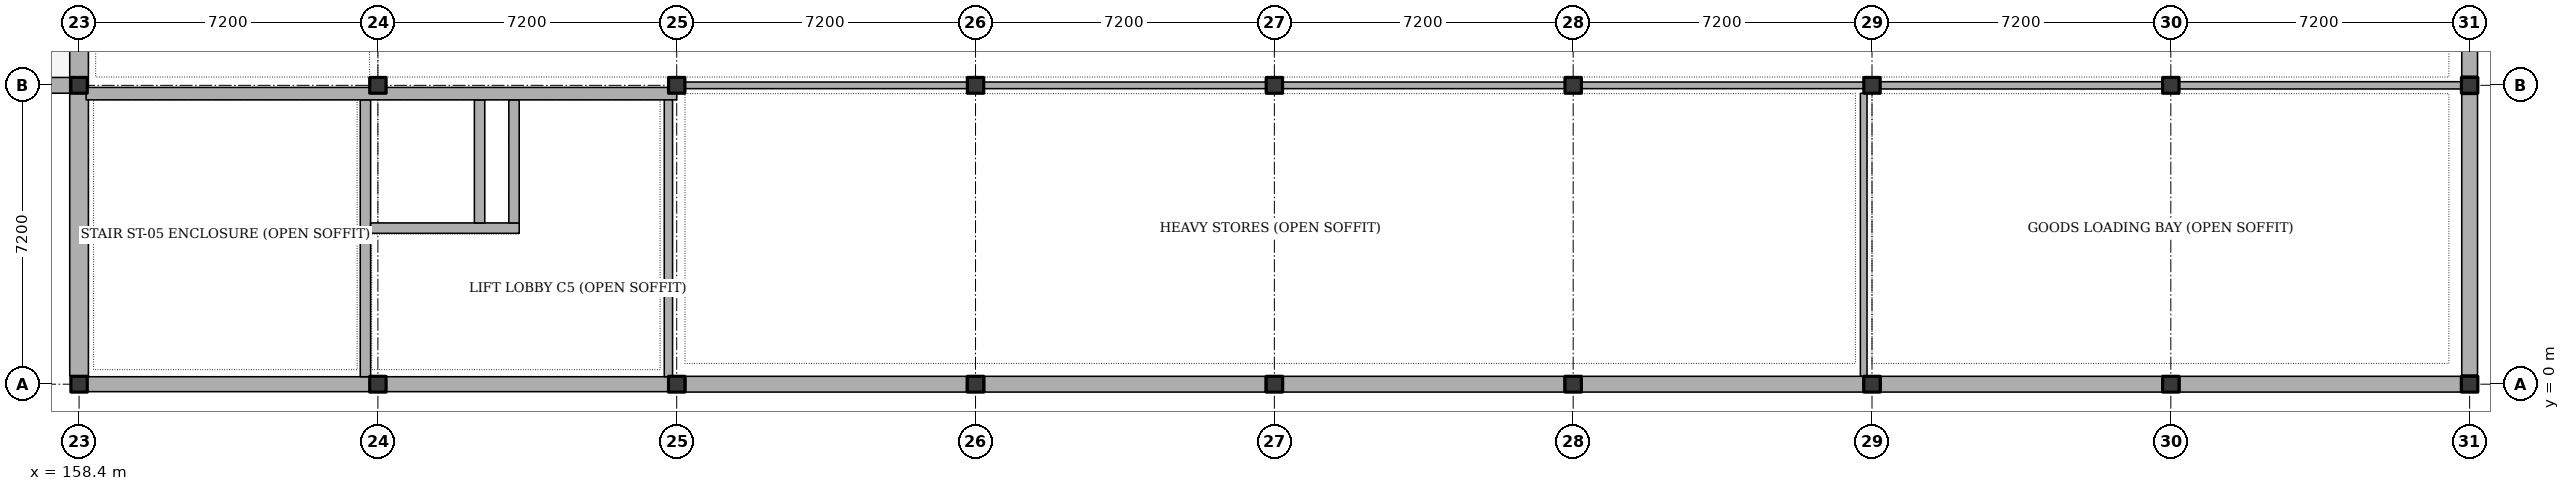
"""IFC4 building model, lengths in metres.
Left out: names, types, materials, properties, quantities, classifications, styles, units other than length and angle.
Written with IfcOpenShell. Run it as: python <this file> out.ifc"""

import sys

from ifc_helpers import new_model, si_unit, direction, frame, frame_2d, origin, origin_2d, place, context, subcontext, project, spatial, rectangle, i_section, extrude, element, fill, save


model = new_model("IFC4")
c1 = context("Model", 3, precision=1e-05, world=origin(), true_north=direction((0.0, 1.0)))
c2 = subcontext(c1, "Body", "Model", "MODEL_VIEW")
j1 = project(units=[si_unit("LENGTHUNIT", "METRE"), si_unit("PLANEANGLEUNIT", "RADIAN")], contexts=[c1])
p1 = place(None, origin())
s1 = spatial("IfcSite", under=j1, at=p1, CompositionType="ELEMENT")
p2 = place(p1, origin())
s2 = spatial("IfcBuilding", under=s1, at=p2, CompositionType="ELEMENT")
p3 = place(p2, origin())
s3 = spatial("IfcBuildingStorey", under=s2, at=p3, CompositionType="ELEMENT", Elevation=0.0)
for number, where, z_axis, x_axis in (
    (1, (158.4, 0.0, -0.3), (0.0, 0.0, 1.0), (1.0, 0.0, 0.0)),
    (2, (158.4, 7.2, -0.3), (0.0, 0.0, 1.0), (1.0, 0.0, 0.0)),
    (3, (165.6, 0.0, -0.3), (0.0, 0.0, 1.0), (1.0, 0.0, 0.0)),
    (4, (165.6, 7.2, -0.3), (0.0, 0.0, 1.0), (1.0, 0.0, 0.0)),
    (5, (172.8, 0.0, -0.3), (0.0, 0.0, 1.0), (1.0, 0.0, 0.0)),
    (6, (172.8, 7.2, -0.3), (0.0, 0.0, 1.0), (1.0, 0.0, 0.0)),
    (7, (180.0, 0.0, -0.3), (0.0, 0.0, 1.0), (1.0, 0.0, 0.0)),
    (8, (180.0, 7.2, -0.3), (0.0, 0.0, 1.0), (1.0, 0.0, 0.0)),
    (9, (187.2, 0.0, -0.3), (0.0, 0.0, 1.0), (1.0, 0.0, 0.0)),
    (10, (187.2, 7.2, -0.3), (0.0, 0.0, 1.0), (1.0, 0.0, 0.0)),
    (11, (194.4, 0.0, -0.3), (0.0, 0.0, 1.0), (1.0, 0.0, 0.0)),
    (12, (194.4, 7.2, -0.3), (0.0, 0.0, 1.0), (1.0, 0.0, 0.0)),
    (13, (201.6, 0.0, -0.3), (0.0, 0.0, 1.0), (1.0, 0.0, 0.0)),
    (14, (201.6, 7.2, -0.3), (0.0, 0.0, 1.0), (1.0, 0.0, 0.0)),
    (15, (208.8, 0.0, -0.3), (0.0, 0.0, 1.0), (1.0, 0.0, 0.0)),
    (16, (208.8, 7.2, -0.3), (0.0, 0.0, 1.0), (1.0, 0.0, 0.0)),
    (17, (216.0, 0.0, -0.3), (0.0, 0.0, 1.0), (1.0, 0.0, 0.0)),
    (18, (216.0, 7.2, -0.3), (0.0, 0.0, 1.0), (1.0, 0.0, 0.0)),
):
    element("IfcColumn", number, at=place(p3, frame(where, z_axis=z_axis, x_axis=x_axis)), inside=s3, PredefinedType="COLUMN", context=c2, shape_type="SweptSolid", body=[
        extrude(i_section(OverallWidth=0.395, OverallDepth=0.381, WebThickness=0.018, FlangeThickness=0.03, FilletRadius=0.015, at=origin_2d()), origin(), (0.0, 0.0, 1.0), 5.7),
    ])
p4 = place(p3, frame((158.183, 7.2, 0.0), z_axis=(0.0, 0.0, 1.0), x_axis=(-1.0, 0.0, 0.0)))
e19 = element("IfcWall", 19, at=p4, inside=s3, PredefinedType="SOLIDWALL", context=c2, shape_type="SweptSolid", body=[
    extrude(rectangle(XDim=6.786, YDim=0.38, at=frame_2d((3.393, 0.0))), origin(), (0.0, 0.0, 1.0), 4.468),
])
p5 = place(p3, frame((216.0, 14.183, 0.0), z_axis=(0.0, 0.0, 1.0), x_axis=(0.0, -1.0, 0.0)))
e20 = element("IfcWall", 20, at=p5, inside=s3, PredefinedType="SOLIDWALL", context=c2, shape_type="SweptSolid", body=[
    extrude(rectangle(XDim=6.765, YDim=0.38, at=frame_2d((3.383, 0.0))), origin(), (0.0, 0.0, 1.0), 4.413),
])
p6 = place(p5, frame((1.066, 0.0, 1.05)))
e21 = element("IfcOpeningElement", 21, at=p6, cuts=e20, PredefinedType="OPENING", context=c2, shape_type="SweptSolid", body=[
    extrude(rectangle(XDim=2.2, YDim=1.35, at=frame_2d((1.1, 0.675))), frame((0.0, 0.2, 0.0), z_axis=(0.0, -1.0, 0.0), x_axis=(1.0, 0.0, 0.0)), (0.0, 0.0, 1.0), 0.4),
])
p7 = place(p3, frame((216.0, 6.983, 0.0), z_axis=(0.0, 0.0, 1.0), x_axis=(0.0, -1.0, 0.0)))
e22 = element("IfcWall", 22, at=p7, inside=s3, PredefinedType="SOLIDWALL", context=c2, shape_type="SweptSolid", body=[
    extrude(rectangle(XDim=6.765, YDim=0.38, at=frame_2d((3.383, 0.0))), origin(), (0.0, 0.0, 1.0), 4.413),
])
p8 = place(p7, frame((2.058, 0.0, 1.05)))
e23 = element("IfcOpeningElement", 23, at=p8, cuts=e22, PredefinedType="OPENING", context=c2, shape_type="SweptSolid", body=[
    extrude(rectangle(XDim=2.65, YDim=1.6, at=frame_2d((1.325, 0.8))), frame((0.0, 0.2, 0.0), z_axis=(0.0, -1.0, 0.0), x_axis=(1.0, 0.0, 0.0)), (0.0, 0.0, 1.0), 0.4),
])
p9 = place(p3, frame((215.783, 0.0, 0.0), z_axis=(0.0, 0.0, 1.0), x_axis=(-1.0, 0.0, 0.0)))
e24 = element("IfcWall", 24, at=p9, inside=s3, PredefinedType="SOLIDWALL", context=c2, shape_type="SweptSolid", body=[
    extrude(rectangle(XDim=6.765, YDim=0.38, at=frame_2d((3.383, 0.0))), origin(), (0.0, 0.0, 1.0), 4.413),
])
p10 = place(p9, frame((1.683, 0.0, 0.0)))
e25 = element("IfcOpeningElement", 25, at=p10, cuts=e24, PredefinedType="OPENING", context=c2, shape_type="SweptSolid", body=[
    extrude(rectangle(XDim=3.4, YDim=4.2, at=frame_2d((1.7, 2.1))), frame((0.0, 0.2, 0.0), z_axis=(0.0, -1.0, 0.0), x_axis=(1.0, 0.0, 0.0)), (0.0, 0.0, 1.0), 0.4),
])
p11 = place(p3, frame((208.583, 0.0, 0.0), z_axis=(0.0, 0.0, 1.0), x_axis=(-1.0, 0.0, 0.0)))
e26 = element("IfcWall", 26, at=p11, inside=s3, PredefinedType="SOLIDWALL", context=c2, shape_type="SweptSolid", body=[
    extrude(rectangle(XDim=6.765, YDim=0.38, at=frame_2d((3.383, 0.0))), origin(), (0.0, 0.0, 1.0), 4.413),
])
p12 = place(p11, frame((2.408, 0.0, 1.05)))
e27 = element("IfcOpeningElement", 27, at=p12, cuts=e26, PredefinedType="OPENING", context=c2, shape_type="SweptSolid", body=[
    extrude(rectangle(XDim=1.95, YDim=2.25, at=frame_2d((0.975, 1.125))), frame((0.0, 0.2, 0.0), z_axis=(0.0, -1.0, 0.0), x_axis=(1.0, 0.0, 0.0)), (0.0, 0.0, 1.0), 0.4),
])
p13 = place(p3, frame((201.383, 0.0, 0.0), z_axis=(0.0, 0.0, 1.0), x_axis=(-1.0, 0.0, 0.0)))
e28 = element("IfcWall", 28, at=p13, inside=s3, PredefinedType="SOLIDWALL", context=c2, shape_type="SweptSolid", body=[
    extrude(rectangle(XDim=6.765, YDim=0.38, at=frame_2d((3.383, 0.0))), origin(), (0.0, 0.0, 1.0), 4.413),
])
p14 = place(p3, frame((194.183, 0.0, 0.0), z_axis=(0.0, 0.0, 1.0), x_axis=(-1.0, 0.0, 0.0)))
e29 = element("IfcWall", 29, at=p14, inside=s3, PredefinedType="SOLIDWALL", context=c2, shape_type="SweptSolid", body=[
    extrude(rectangle(XDim=6.765, YDim=0.38, at=frame_2d((3.383, 0.0))), origin(), (0.0, 0.0, 1.0), 4.413),
])
p15 = place(p14, frame((2.733, 0.0, 1.05)))
e30 = element("IfcOpeningElement", 30, at=p15, cuts=e29, PredefinedType="OPENING", context=c2, shape_type="SweptSolid", body=[
    extrude(rectangle(XDim=1.3, YDim=1.6, at=frame_2d((0.65, 0.8))), frame((0.0, 0.2, 0.0), z_axis=(0.0, -1.0, 0.0), x_axis=(1.0, 0.0, 0.0)), (0.0, 0.0, 1.0), 0.4),
])
p16 = place(p3, frame((186.983, 0.0, 0.0), z_axis=(0.0, 0.0, 1.0), x_axis=(-1.0, 0.0, 0.0)))
e31 = element("IfcWall", 31, at=p16, inside=s3, PredefinedType="SOLIDWALL", context=c2, shape_type="SweptSolid", body=[
    extrude(rectangle(XDim=6.765, YDim=0.38, at=frame_2d((3.383, 0.0))), origin(), (0.0, 0.0, 1.0), 4.25),
])
p17 = place(p3, frame((179.783, 0.0, 0.0), z_axis=(0.0, 0.0, 1.0), x_axis=(-1.0, 0.0, 0.0)))
e32 = element("IfcWall", 32, at=p17, inside=s3, PredefinedType="SOLIDWALL", context=c2, shape_type="SweptSolid", body=[
    extrude(rectangle(XDim=6.765, YDim=0.38, at=frame_2d((3.383, 0.0))), origin(), (0.0, 0.0, 1.0), 4.25),
])
p18 = place(p17, frame((2.283, 0.0, 1.05)))
e33 = element("IfcOpeningElement", 33, at=p18, cuts=e32, PredefinedType="OPENING", context=c2, shape_type="SweptSolid", body=[
    extrude(rectangle(XDim=2.2, YDim=1.35, at=frame_2d((1.1, 0.675))), frame((0.0, 0.2, 0.0), z_axis=(0.0, -1.0, 0.0), x_axis=(1.0, 0.0, 0.0)), (0.0, 0.0, 1.0), 0.4),
])
p19 = place(p3, frame((172.8, 0.0, 0.0), z_axis=(0.0, 0.0, 1.0), x_axis=(-1.0, 0.0, 0.0)))
e34 = element("IfcWall", 34, at=p19, inside=s3, PredefinedType="SHEAR", context=c2, shape_type="SweptSolid", body=[
    extrude(rectangle(XDim=7.2, YDim=0.36, at=frame_2d((3.6, 0.0))), origin(), (0.0, 0.0, 1.0), 4.25),
])
p20 = place(p3, frame((165.6, 0.0, 0.0), z_axis=(0.0, 0.0, 1.0), x_axis=(-1.0, 0.0, 0.0)))
e35 = element("IfcWall", 35, at=p20, inside=s3, PredefinedType="SHEAR", context=c2, shape_type="SweptSolid", body=[
    extrude(rectangle(XDim=7.2, YDim=0.36, at=frame_2d((3.6, 0.0))), origin(), (0.0, 0.0, 1.0), 4.35),
])
p21 = place(p20, frame((2.85, 0.0, 0.0)))
e36 = element("IfcOpeningElement", 36, at=p21, cuts=e35, PredefinedType="OPENING", context=c2, shape_type="SweptSolid", body=[
    extrude(rectangle(XDim=1.5, YDim=2.15, at=frame_2d((0.75, 1.075))), frame((0.0, 0.19, 0.0), z_axis=(0.0, -1.0, 0.0), x_axis=(1.0, 0.0, 0.0)), (0.0, 0.0, 1.0), 0.38),
])
p22 = place(p3, frame((158.4, 0.198, 0.0), z_axis=(0.0, 0.0, 1.0), x_axis=(0.0, 1.0, 0.0)))
e37 = element("IfcWall", 37, at=p22, inside=s3, PredefinedType="SOLIDWALL", context=c2, shape_type="SweptSolid", body=[
    extrude(rectangle(XDim=7.002, YDim=0.45, at=frame_2d((3.501, 0.0))), origin(), (0.0, 0.0, 1.0), 4.4),
])
p23 = place(p3, frame((158.4, 7.2, 0.0), z_axis=(0.0, 0.0, 1.0), x_axis=(0.0, 1.0, 0.0)))
e38 = element("IfcWall", 38, at=p23, inside=s3, PredefinedType="SOLIDWALL", context=c2, shape_type="SweptSolid", body=[
    extrude(rectangle(XDim=7.2, YDim=0.45, at=frame_2d((3.6, 0.0))), origin(), (0.0, 0.0, 1.0), 4.468),
])
p24 = place(p3, frame((165.3, 0.18, 0.0), z_axis=(0.0, 0.0, 1.0), x_axis=(0.0, 1.0, 0.0)))
e39 = element("IfcWall", 39, at=p24, inside=s3, PredefinedType="SHEAR", context=c2, shape_type="SweptSolid", body=[
    extrude(rectangle(XDim=6.67, YDim=0.25, at=frame_2d((3.335, 0.0))), origin(), (0.0, 0.0, 1.0), 4.45),
])
p25 = place(p24, frame((1.12, 0.0, 0.0)))
e40 = element("IfcOpeningElement", 40, at=p25, cuts=e39, PredefinedType="OPENING", context=c2, shape_type="SweptSolid", body=[
    extrude(rectangle(XDim=1.35, YDim=2.15, at=frame_2d((0.675, 1.075))), frame((0.0, 0.135, 0.0), z_axis=(0.0, -1.0, 0.0), x_axis=(1.0, 0.0, 0.0)), (0.0, 0.0, 1.0), 0.27),
])
p26 = place(p3, frame((165.425, 3.76, 0.0), z_axis=(0.0, 0.0, 1.0), x_axis=(1.0, 0.0, 0.0)))
e41 = element("IfcWall", 41, at=p26, inside=s3, PredefinedType="SHEAR", context=c2, shape_type="SweptSolid", body=[
    extrude(rectangle(XDim=3.58, YDim=0.25, at=frame_2d((1.79, 0.0))), origin(), (0.0, 0.0, 1.0), 4.45),
])
p27 = place(p26, frame((0.775, 0.0, 0.0)))
e42 = element("IfcOpeningElement", 42, at=p27, cuts=e41, PredefinedType="OPENING", context=c2, shape_type="SweptSolid", body=[
    extrude(rectangle(XDim=1.3, YDim=2.2, at=frame_2d((0.65, 1.1))), frame((0.0, 0.135, 0.0), z_axis=(0.0, -1.0, 0.0), x_axis=(1.0, 0.0, 0.0)), (0.0, 0.0, 1.0), 0.27),
])
p28 = place(p3, frame((168.05, 3.885, 0.0), z_axis=(0.0, 0.0, 1.0), x_axis=(0.0, 1.0, 0.0)))
e43 = element("IfcWall", 43, at=p28, inside=s3, PredefinedType="SHEAR", context=c2, shape_type="SweptSolid", body=[
    extrude(rectangle(XDim=2.965, YDim=0.25, at=frame_2d((1.482, 0.0))), origin(), (0.0, 0.0, 1.0), 4.45),
])
p29 = place(p3, frame((168.88, 3.885, 0.0), z_axis=(0.0, 0.0, 1.0), x_axis=(0.0, 1.0, 0.0)))
e44 = element("IfcWall", 44, at=p29, inside=s3, PredefinedType="SHEAR", context=c2, shape_type="SweptSolid", body=[
    extrude(rectangle(XDim=2.965, YDim=0.25, at=frame_2d((1.482, 0.0))), origin(), (0.0, 0.0, 1.0), 4.45),
])
p30 = place(p29, frame((0.9, 0.0, 0.0)))
e45 = element("IfcOpeningElement", 45, at=p30, cuts=e44, PredefinedType="OPENING", context=c2, shape_type="SweptSolid", body=[
    extrude(rectangle(XDim=0.92, YDim=2.05, at=frame_2d((0.46, 1.025))), frame((0.0, 0.135, 0.0), z_axis=(0.0, -1.0, 0.0), x_axis=(1.0, 0.0, 0.0)), (0.0, 0.0, 1.0), 0.27),
])
p31 = place(p3, frame((158.57, 7.0, 0.0), z_axis=(0.0, 0.0, 1.0), x_axis=(1.0, 0.0, 0.0)))
e46 = element("IfcWall", 46, at=p31, inside=s3, PredefinedType="SHEAR", context=c2, shape_type="SweptSolid", body=[
    extrude(rectangle(XDim=14.23, YDim=0.3, at=frame_2d((7.115, 0.0))), origin(), (0.0, 0.0, 1.0), 4.45),
])
p32 = place(p31, frame((11.38, 0.0, 0.0)))
e47 = element("IfcOpeningElement", 47, at=p32, cuts=e46, PredefinedType="OPENING", context=c2, shape_type="SweptSolid", body=[
    extrude(rectangle(XDim=1.5, YDim=2.15, at=frame_2d((0.75, 1.075))), frame((0.0, 0.16, 0.0), z_axis=(0.0, -1.0, 0.0), x_axis=(1.0, 0.0, 0.0)), (0.0, 0.0, 1.0), 0.32),
])
p33 = place(p3, frame((172.6, 0.18, 0.0), z_axis=(0.0, 0.0, 1.0), x_axis=(0.0, 1.0, 0.0)))
e48 = element("IfcWall", 48, at=p33, inside=s3, PredefinedType="SOLIDWALL", context=c2, shape_type="SweptSolid", body=[
    extrude(rectangle(XDim=6.67, YDim=0.2, at=frame_2d((3.335, 0.0))), origin(), (0.0, 0.0, 1.0), 4.245),
])
p34 = place(p3, frame((172.999, 7.2, 0.0), z_axis=(0.0, 0.0, 1.0), x_axis=(1.0, 0.0, 0.0)))
e49 = element("IfcWall", 49, at=p34, inside=s3, PredefinedType="PARTITIONING", context=c2, shape_type="SweptSolid", body=[
    extrude(rectangle(XDim=6.802, YDim=0.16, at=frame_2d((3.401, 0.0))), origin(), (0.0, 0.0, 1.0), 3.55),
])
p35 = place(p3, frame((180.199, 7.2, 0.0), z_axis=(0.0, 0.0, 1.0), x_axis=(1.0, 0.0, 0.0)))
e50 = element("IfcWall", 50, at=p35, inside=s3, PredefinedType="PARTITIONING", context=c2, shape_type="SweptSolid", body=[
    extrude(rectangle(XDim=6.802, YDim=0.16, at=frame_2d((3.401, 0.0))), origin(), (0.0, 0.0, 1.0), 3.55),
])
p36 = place(p35, frame((2.861, 0.0, 0.0)))
e51 = element("IfcOpeningElement", 51, at=p36, cuts=e50, PredefinedType="OPENING", context=c2, shape_type="SweptSolid", body=[
    extrude(rectangle(XDim=1.08, YDim=2.15, at=frame_2d((0.54, 1.075))), frame((0.0, 0.09, 0.0), z_axis=(0.0, -1.0, 0.0), x_axis=(1.0, 0.0, 0.0)), (0.0, 0.0, 1.0), 0.18),
])
p37 = place(p3, frame((187.399, 7.2, 0.0), z_axis=(0.0, 0.0, 1.0), x_axis=(1.0, 0.0, 0.0)))
e52 = element("IfcWall", 52, at=p37, inside=s3, PredefinedType="PARTITIONING", context=c2, shape_type="SweptSolid", body=[
    extrude(rectangle(XDim=6.802, YDim=0.16, at=frame_2d((3.401, 0.0))), origin(), (0.0, 0.0, 1.0), 3.55),
])
p38 = place(p3, frame((194.599, 7.2, 0.0), z_axis=(0.0, 0.0, 1.0), x_axis=(1.0, 0.0, 0.0)))
e53 = element("IfcWall", 53, at=p38, inside=s3, PredefinedType="PARTITIONING", context=c2, shape_type="SweptSolid", body=[
    extrude(rectangle(XDim=6.801, YDim=0.16, at=frame_2d((3.4, 0.0))), origin(), (0.0, 0.0, 1.0), 3.55),
])
p39 = place(p3, frame((201.799, 7.2, 0.0), z_axis=(0.0, 0.0, 1.0), x_axis=(1.0, 0.0, 0.0)))
e54 = element("IfcWall", 54, at=p39, inside=s3, PredefinedType="PARTITIONING", context=c2, shape_type="SweptSolid", body=[
    extrude(rectangle(XDim=6.802, YDim=0.175, at=frame_2d((3.401, 0.0))), origin(), (0.0, 0.0, 1.0), 3.55),
])
p40 = place(p39, frame((2.841, 0.0, 0.0)))
e55 = element("IfcOpeningElement", 55, at=p40, cuts=e54, PredefinedType="OPENING", context=c2, shape_type="SweptSolid", body=[
    extrude(rectangle(XDim=1.12, YDim=2.18, at=frame_2d((0.56, 1.09))), frame((0.0, 0.097, 0.0), z_axis=(0.0, -1.0, 0.0), x_axis=(1.0, 0.0, 0.0)), (0.0, 0.0, 1.0), 0.195),
])
p41 = place(p3, frame((208.999, 7.2, 0.0), z_axis=(0.0, 0.0, 1.0), x_axis=(1.0, 0.0, 0.0)))
e56 = element("IfcWall", 56, at=p41, inside=s3, PredefinedType="PARTITIONING", context=c2, shape_type="SweptSolid", body=[
    extrude(rectangle(XDim=6.802, YDim=0.175, at=frame_2d((3.401, 0.0))), origin(), (0.0, 0.0, 1.0), 3.55),
])
p42 = place(p3, frame((201.4, 0.193, 0.0), z_axis=(0.0, 0.0, 1.0), x_axis=(0.0, 1.0, 0.0)))
e57 = element("IfcWall", 57, at=p42, inside=s3, PredefinedType="PARTITIONING", context=c2, shape_type="SweptSolid", body=[
    extrude(rectangle(XDim=6.815, YDim=0.16, at=frame_2d((3.407, 0.0))), origin(), (0.0, 0.0, 1.0), 3.55),
])
p43 = place(p8, origin())
e58 = element("IfcWindow", 58, at=p43, inside=s3, PartitioningType="SINGLE_PANEL", PredefinedType="WINDOW", context=c2, shape_type="SweptSolid", body=[
    extrude(rectangle(XDim=2.65, YDim=1.6, at=frame_2d((1.325, 0.8))), frame((0.0, 0.03, 0.0), z_axis=(0.0, -1.0, 0.0), x_axis=(1.0, 0.0, 0.0)), (0.0, 0.0, 1.0), 0.06),
])
fill(e23, e58)
p44 = place(p12, origin())
e59 = element("IfcWindow", 59, at=p44, inside=s3, PartitioningType="SINGLE_PANEL", PredefinedType="WINDOW", context=c2, shape_type="SweptSolid", body=[
    extrude(rectangle(XDim=1.95, YDim=2.25, at=frame_2d((0.975, 1.125))), frame((0.0, 0.03, 0.0), z_axis=(0.0, -1.0, 0.0), x_axis=(1.0, 0.0, 0.0)), (0.0, 0.0, 1.0), 0.06),
])
fill(e27, e59)
p45 = place(p15, origin())
e60 = element("IfcWindow", 60, at=p45, inside=s3, PartitioningType="SINGLE_PANEL", PredefinedType="WINDOW", context=c2, shape_type="SweptSolid", body=[
    extrude(rectangle(XDim=1.3, YDim=1.6, at=frame_2d((0.65, 0.8))), frame((0.0, 0.03, 0.0), z_axis=(0.0, -1.0, 0.0), x_axis=(1.0, 0.0, 0.0)), (0.0, 0.0, 1.0), 0.06),
])
fill(e30, e60)
p46 = place(p18, origin())
e61 = element("IfcWindow", 61, at=p46, inside=s3, PartitioningType="SINGLE_PANEL", PredefinedType="WINDOW", context=c2, shape_type="SweptSolid", body=[
    extrude(rectangle(XDim=2.2, YDim=1.35, at=frame_2d((1.1, 0.675))), frame((0.0, 0.03, 0.0), z_axis=(0.0, -1.0, 0.0), x_axis=(1.0, 0.0, 0.0)), (0.0, 0.0, 1.0), 0.06),
])
fill(e33, e61)
p47 = place(p21, origin())
e62 = element("IfcDoor", 62, at=p47, inside=s3, OperationType="SINGLE_SWING_RIGHT", PredefinedType="DOOR", context=c2, shape_type="SweptSolid", body=[
    extrude(rectangle(XDim=1.5, YDim=2.15, at=frame_2d((0.75, 1.075))), frame((0.0, 0.025, 0.0), z_axis=(0.0, -1.0, 0.0), x_axis=(1.0, 0.0, 0.0)), (0.0, 0.0, 1.0), 0.05),
])
fill(e36, e62)
p48 = place(p10, origin())
e63 = element("IfcDoor", 63, at=p48, inside=s3, OperationType="ROLLINGUP", PredefinedType="GATE", context=c2, shape_type="SweptSolid", body=[
    extrude(rectangle(XDim=3.4, YDim=4.2, at=frame_2d((1.7, 2.1))), frame((0.0, 0.025, 0.0), z_axis=(0.0, -1.0, 0.0), x_axis=(1.0, 0.0, 0.0)), (0.0, 0.0, 1.0), 0.05),
])
fill(e25, e63)
p49 = place(p25, origin())
e64 = element("IfcDoor", 64, at=p49, inside=s3, OperationType="SINGLE_SWING_LEFT", PredefinedType="DOOR", context=c2, shape_type="SweptSolid", body=[
    extrude(rectangle(XDim=1.35, YDim=2.15, at=frame_2d((0.675, 1.075))), frame((0.0, 0.025, 0.0), z_axis=(0.0, -1.0, 0.0), x_axis=(1.0, 0.0, 0.0)), (0.0, 0.0, 1.0), 0.05),
])
fill(e40, e64)
p50 = place(p27, origin())
e65 = element("IfcDoor", 65, at=p50, inside=s3, OperationType="SLIDING_TO_LEFT", PredefinedType="DOOR", context=c2, shape_type="SweptSolid", body=[
    extrude(rectangle(XDim=1.3, YDim=2.2, at=frame_2d((0.65, 1.1))), frame((0.0, 0.025, 0.0), z_axis=(0.0, -1.0, 0.0), x_axis=(1.0, 0.0, 0.0)), (0.0, 0.0, 1.0), 0.05),
])
fill(e42, e65)
p51 = place(p30, origin())
e66 = element("IfcDoor", 66, at=p51, inside=s3, OperationType="SINGLE_SWING_RIGHT", PredefinedType="DOOR", context=c2, shape_type="SweptSolid", body=[
    extrude(rectangle(XDim=0.92, YDim=2.05, at=frame_2d((0.46, 1.025))), frame((0.0, 0.025, 0.0), z_axis=(0.0, -1.0, 0.0), x_axis=(1.0, 0.0, 0.0)), (0.0, 0.0, 1.0), 0.05),
])
fill(e45, e66)
p52 = place(p32, origin())
e67 = element("IfcDoor", 67, at=p52, inside=s3, OperationType="SINGLE_SWING_LEFT", PredefinedType="DOOR", context=c2, shape_type="SweptSolid", body=[
    extrude(rectangle(XDim=1.5, YDim=2.15, at=frame_2d((0.75, 1.075))), frame((0.0, 0.025, 0.0), z_axis=(0.0, -1.0, 0.0), x_axis=(1.0, 0.0, 0.0)), (0.0, 0.0, 1.0), 0.05),
])
fill(e47, e67)
p53 = place(p36, origin())
e68 = element("IfcDoor", 68, at=p53, inside=s3, OperationType="SINGLE_SWING_LEFT", PredefinedType="DOOR", context=c2, shape_type="SweptSolid", body=[
    extrude(rectangle(XDim=1.08, YDim=2.15, at=frame_2d((0.54, 1.075))), frame((0.0, 0.025, 0.0), z_axis=(0.0, -1.0, 0.0), x_axis=(1.0, 0.0, 0.0)), (0.0, 0.0, 1.0), 0.05),
])
fill(e51, e68)
p54 = place(p40, origin())
e69 = element("IfcDoor", 69, at=p54, inside=s3, OperationType="SINGLE_SWING_RIGHT", PredefinedType="DOOR", context=c2, shape_type="SweptSolid", body=[
    extrude(rectangle(XDim=1.12, YDim=2.18, at=frame_2d((0.56, 1.09))), frame((0.0, 0.025, 0.0), z_axis=(0.0, -1.0, 0.0), x_axis=(1.0, 0.0, 0.0)), (0.0, 0.0, 1.0), 0.05),
])
fill(e55, e69)
save(model, sys.argv[1])
